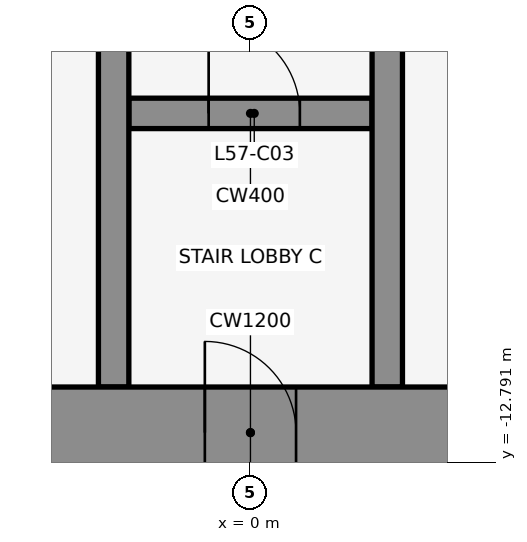
"""IFC4 building model, lengths in metres.
Left out: names, types, materials, properties, quantities, classifications, styles, units other than length and angle.
Written with IfcOpenShell. Run it as: python <this file> out.ifc"""

import sys

from ifc_helpers import new_model, si_unit, direction, frame, frame_2d, origin, place, context, subcontext, project, spatial, rectangle, extrude, element, fill, save


model = new_model("IFC4")
c1 = context("Model", 3, precision=1e-05, world=origin(), true_north=direction((0.0, 1.0)))
c2 = subcontext(c1, "Body", "Model", "MODEL_VIEW")
j1 = project(units=[si_unit("LENGTHUNIT", "METRE"), si_unit("PLANEANGLEUNIT", "RADIAN")], contexts=[c1])
p1 = place(None, origin())
s1 = spatial("IfcSite", under=j1, at=p1, CompositionType="ELEMENT")
p2 = place(p1, origin())
s2 = spatial("IfcBuilding", under=s1, at=p2, CompositionType="ELEMENT")
p3 = place(p2, frame((0.0, 0.0, 254.0)))
s3 = spatial("IfcBuildingStorey", under=s2, at=p3, CompositionType="ELEMENT", Elevation=254.0)
p4 = place(p3, frame((-1.6, -8.2, 0.0), z_axis=(0.0, 0.0, 1.0), x_axis=(1.0, 0.0, 0.0)))
e1 = element("IfcWall", 1, at=p4, inside=s3, PredefinedType="SHEAR", context=c2, shape_type="SweptSolid", body=[
    extrude(rectangle(XDim=3.2, YDim=0.4, at=frame_2d((1.6, 0.0))), origin(), (0.0, 0.0, 1.0), 4.2),
])
p5 = place(p4, frame((1.05, 0.0, 0.0)))
e2 = element("IfcOpeningElement", 2, at=p5, cuts=e1, PredefinedType="OPENING", context=c2, shape_type="SweptSolid", body=[
    extrude(rectangle(XDim=1.2, YDim=2.1, at=frame_2d((0.6, 1.05))), frame((0.0, 0.212, 0.0), z_axis=(0.0, -1.0, 0.0), x_axis=(1.0, 0.0, 0.0)), (0.0, 0.0, 1.0), 0.424),
])
for number, where, z_axis, x_axis in (
    (3, (-1.8, -11.8, 0.0), (0.0, 0.0, 1.0), (0.0, 1.0, 0.0)),
    (4, (1.8, -11.8, 0.0), (0.0, 0.0, 1.0), (0.0, 1.0, 0.0)),
):
    element("IfcWall", number, at=place(p3, frame(where, z_axis=z_axis, x_axis=x_axis)), inside=s3, PredefinedType="SHEAR", context=c2, shape_type="SweptSolid", body=[
        extrude(rectangle(XDim=10.6, YDim=0.4, at=frame_2d((5.3, 0.0))), origin(), (0.0, 0.0, 1.0), 4.2),
    ])
p6 = place(p3, frame((-22.0, -12.4, 0.0), z_axis=(0.0, 0.0, 1.0), x_axis=(1.0, 0.0, 0.0)))
e5 = element("IfcWall", 5, at=p6, inside=s3, PredefinedType="SHEAR", context=c2, shape_type="SweptSolid", body=[
    extrude(rectangle(XDim=44.0, YDim=1.2, at=frame_2d((22.0, 0.0))), origin(), (0.0, 0.0, 1.0), 4.2),
])
p7 = place(p6, frame((2.2, 0.0, 0.0)))
e6 = element("IfcOpeningElement", 6, at=p7, cuts=e5, PredefinedType="OPENING", context=c2, shape_type="SweptSolid", body=[
    extrude(rectangle(XDim=1.2, YDim=2.1, at=frame_2d((0.6, 1.05))), frame((0.0, 0.612, 0.0), z_axis=(0.0, -1.0, 0.0), x_axis=(1.0, 0.0, 0.0)), (0.0, 0.0, 1.0), 1.224),
])
p8 = place(p6, frame((21.4, 0.0, 0.0)))
e7 = element("IfcOpeningElement", 7, at=p8, cuts=e5, PredefinedType="OPENING", context=c2, shape_type="SweptSolid", body=[
    extrude(rectangle(XDim=1.2, YDim=2.1, at=frame_2d((0.6, 1.05))), frame((0.0, 0.612, 0.0), z_axis=(0.0, -1.0, 0.0), x_axis=(1.0, 0.0, 0.0)), (0.0, 0.0, 1.0), 1.224),
])
p9 = place(p6, frame((40.6, 0.0, 0.0)))
e8 = element("IfcOpeningElement", 8, at=p9, cuts=e5, PredefinedType="OPENING", context=c2, shape_type="SweptSolid", body=[
    extrude(rectangle(XDim=1.2, YDim=2.1, at=frame_2d((0.6, 1.05))), frame((0.0, 0.612, 0.0), z_axis=(0.0, -1.0, 0.0), x_axis=(1.0, 0.0, 0.0)), (0.0, 0.0, 1.0), 1.224),
])
p10 = place(p6, frame((16.0, 0.0, 0.0)))
e9 = element("IfcOpeningElement", 9, at=p10, cuts=e5, PredefinedType="OPENING", context=c2, shape_type="SweptSolid", body=[
    extrude(rectangle(XDim=1.8, YDim=2.1, at=frame_2d((0.9, 1.05))), frame((0.0, 0.612, 0.0), z_axis=(0.0, -1.0, 0.0), x_axis=(1.0, 0.0, 0.0)), (0.0, 0.0, 1.0), 1.224),
])
p11 = place(p6, frame((6.3, 0.0, 0.0)))
e10 = element("IfcOpeningElement", 10, at=p11, cuts=e5, PredefinedType="OPENING", context=c2, shape_type="SweptSolid", body=[
    extrude(rectangle(XDim=1.2, YDim=2.1, at=frame_2d((0.6, 1.05))), frame((0.0, 0.612, 0.0), z_axis=(0.0, -1.0, 0.0), x_axis=(1.0, 0.0, 0.0)), (0.0, 0.0, 1.0), 1.224),
])
p12 = place(p6, frame((26.2, 0.0, 0.0)))
e11 = element("IfcOpeningElement", 11, at=p12, cuts=e5, PredefinedType="OPENING", context=c2, shape_type="SweptSolid", body=[
    extrude(rectangle(XDim=1.8, YDim=2.1, at=frame_2d((0.9, 1.05))), frame((0.0, 0.612, 0.0), z_axis=(0.0, -1.0, 0.0), x_axis=(1.0, 0.0, 0.0)), (0.0, 0.0, 1.0), 1.224),
])
p13 = place(p6, frame((36.5, 0.0, 0.0)))
e12 = element("IfcOpeningElement", 12, at=p13, cuts=e5, PredefinedType="OPENING", context=c2, shape_type="SweptSolid", body=[
    extrude(rectangle(XDim=1.2, YDim=2.1, at=frame_2d((0.6, 1.05))), frame((0.0, 0.612, 0.0), z_axis=(0.0, -1.0, 0.0), x_axis=(1.0, 0.0, 0.0)), (0.0, 0.0, 1.0), 1.224),
])
p14 = place(p5, origin())
e13 = element("IfcDoor", 13, at=p14, inside=s3, OperationType="SINGLE_SWING_LEFT", PredefinedType="DOOR", context=c2, shape_type="SweptSolid", body=[
    extrude(rectangle(XDim=1.2, YDim=2.1, at=frame_2d((0.6, 1.05))), frame((0.0, 0.025, 0.0), z_axis=(0.0, -1.0, 0.0), x_axis=(1.0, 0.0, 0.0)), (0.0, 0.0, 1.0), 0.05),
])
fill(e2, e13)
p15 = place(p8, frame((1.2, 0.0, 0.0), z_axis=(0.0, 0.0, 1.0), x_axis=(-1.0, 0.0, 0.0)))
e14 = element("IfcDoor", 14, at=p15, inside=s3, OperationType="SINGLE_SWING_RIGHT", PredefinedType="DOOR", context=c2, shape_type="SweptSolid", body=[
    extrude(rectangle(XDim=1.2, YDim=2.1, at=frame_2d((0.6, 1.05))), frame((0.0, 0.025, 0.0), z_axis=(0.0, -1.0, 0.0), x_axis=(1.0, 0.0, 0.0)), (0.0, 0.0, 1.0), 0.05),
])
fill(e7, e14)
save(model, sys.argv[1])
